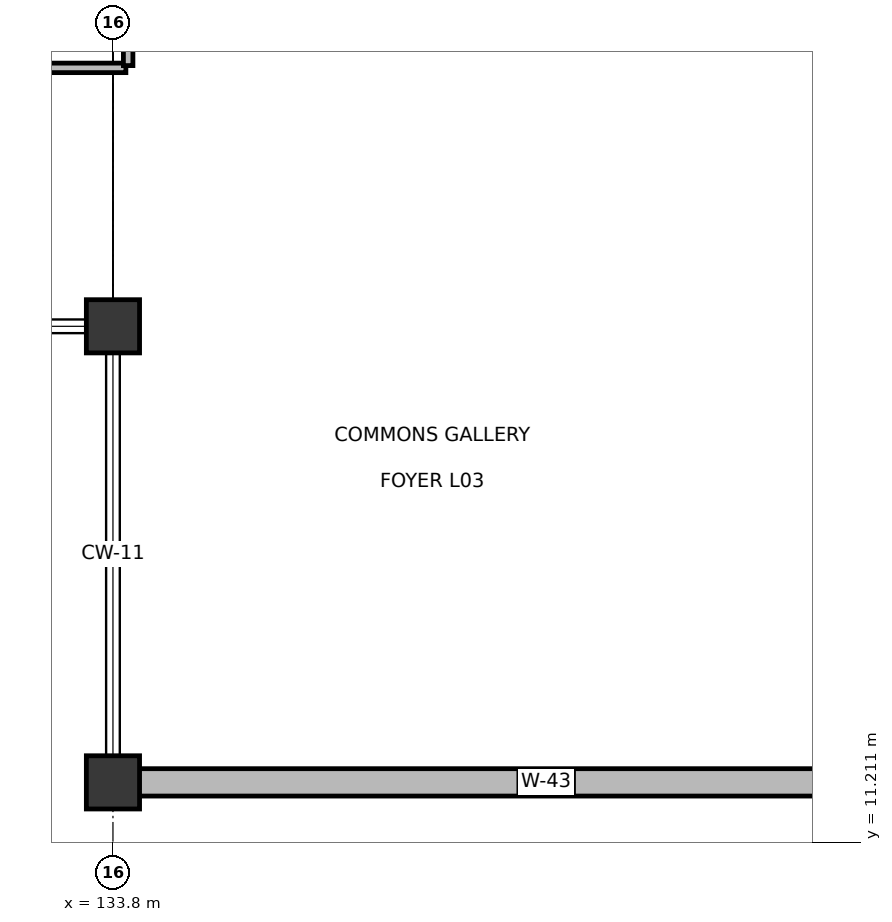
"""IFC4 building model, lengths in metres.
Left out: names, types, materials, properties, quantities, classifications, styles, units other than length and angle.
Written with IfcOpenShell. Run it as: python <this file> out.ifc"""

import sys

from ifc_helpers import new_model, si_unit, direction, frame, frame_2d, origin, origin_2d, place, context, subcontext, project, spatial, rectangle, extrude, element, fill, save


model = new_model("IFC4")
c1 = context("Model", 3, precision=1e-05, world=origin(), true_north=direction((0.0, 1.0)))
c2 = subcontext(c1, "Body", "Model", "MODEL_VIEW")
j1 = project(units=[si_unit("LENGTHUNIT", "METRE"), si_unit("PLANEANGLEUNIT", "RADIAN")], contexts=[c1])
p1 = place(None, origin())
s1 = spatial("IfcSite", under=j1, at=p1, CompositionType="ELEMENT")
p2 = place(p1, origin())
s2 = spatial("IfcBuilding", under=s1, at=p2, CompositionType="ELEMENT")
p3 = place(p2, frame((0.0, 0.0, 15.0)))
s3 = spatial("IfcBuildingStorey", under=s2, at=p3, CompositionType="ELEMENT", Elevation=15.0)
for number, where, z_axis, x_axis in (
    (1, (133.8, 18.0, 0.0), (0.0, 0.0, 1.0), (1.0, 0.0, 0.0)),
    (2, (133.8, 12.0, 0.0), (0.0, 0.0, 1.0), (1.0, 0.0, 0.0)),
):
    element("IfcColumn", number, at=place(p3, frame(where, z_axis=z_axis, x_axis=x_axis)), inside=s3, PredefinedType="COLUMN", context=c2, shape_type="SweptSolid", body=[
        extrude(rectangle(XDim=0.7, YDim=0.7, at=origin_2d()), origin(), (0.0, 0.0, 1.0), 4.5),
    ])
p4 = place(p3, frame((134.135, 12.0, 0.0), z_axis=(0.0, 0.0, 1.0), x_axis=(1.0, 0.0, 0.0)))
e3 = element("IfcWall", 3, at=p4, inside=s3, PredefinedType="SOLIDWALL", context=c2, shape_type="SweptSolid", body=[
    extrude(rectangle(XDim=10.73, YDim=0.36, at=frame_2d((5.365, 0.0))), origin(), (0.0, 0.0, 1.0), 3.385),
])
p5 = place(p4, frame((4.99, 0.0, 0.85)))
e4 = element("IfcOpeningElement", 4, at=p5, cuts=e3, PredefinedType="OPENING", context=c2, shape_type="SweptSolid", body=[
    extrude(rectangle(XDim=0.75, YDim=1.55, at=frame_2d((0.375, 0.775))), frame((0.0, 0.19, 0.0), z_axis=(0.0, -1.0, 0.0), x_axis=(1.0, 0.0, 0.0)), (0.0, 0.0, 1.0), 0.38),
])
p6 = place(p3, frame((119.73, 21.4, 0.0), z_axis=(0.0, 0.0, 1.0), x_axis=(1.0, 0.0, 0.0)))
e5 = element("IfcWall", 5, at=p6, inside=s3, PredefinedType="PARTITIONING", context=c2, shape_type="SweptSolid", body=[
    extrude(rectangle(XDim=14.24, YDim=0.125, at=frame_2d((7.12, 0.0))), origin(), (0.0, 0.0, 1.0), 3.555),
])
p7 = place(p6, frame((6.53, 0.0, 0.0)))
e6 = element("IfcOpeningElement", 6, at=p7, cuts=e5, PredefinedType="OPENING", context=c2, shape_type="SweptSolid", body=[
    extrude(rectangle(XDim=1.18, YDim=2.2, at=frame_2d((0.59, 1.1))), frame((0.0, 0.073, 0.0), z_axis=(0.0, -1.0, 0.0), x_axis=(1.0, 0.0, 0.0)), (0.0, 0.0, 1.0), 0.145),
])
p8 = place(p3, frame((134.0, 21.43, 0.0), z_axis=(0.0, 0.0, 1.0), x_axis=(0.0, 1.0, 0.0)))
e7 = element("IfcWall", 7, at=p8, inside=s3, PredefinedType="PARTITIONING", context=c2, shape_type="SweptSolid", body=[
    extrude(rectangle(XDim=2.54, YDim=0.125, at=frame_2d((1.27, 0.0))), origin(), (0.0, 0.0, 1.0), 3.555),
])
p9 = place(p8, frame((0.41, 0.0, 0.0)))
e8 = element("IfcOpeningElement", 8, at=p9, cuts=e7, PredefinedType="OPENING", context=c2, shape_type="SweptSolid", body=[
    extrude(rectangle(XDim=1.0, YDim=2.15, at=frame_2d((0.5, 1.075))), frame((0.0, 0.073, 0.0), z_axis=(0.0, -1.0, 0.0), x_axis=(1.0, 0.0, 0.0)), (0.0, 0.0, 1.0), 0.145),
])
p10 = place(p5, frame((0.75, 0.0, 0.0), z_axis=(0.0, 0.0, 1.0), x_axis=(-1.0, 0.0, 0.0)))
e9 = element("IfcWindow", 9, at=p10, inside=s3, PartitioningType="DOUBLE_PANEL_VERTICAL", PredefinedType="WINDOW", context=c2, shape_type="SweptSolid", body=[
    extrude(rectangle(XDim=0.75, YDim=1.55, at=frame_2d((0.375, 0.775))), frame((0.0, 0.03, 0.0), z_axis=(0.0, -1.0, 0.0), x_axis=(1.0, 0.0, 0.0)), (0.0, 0.0, 1.0), 0.06),
])
fill(e4, e9)
save(model, sys.argv[1])
